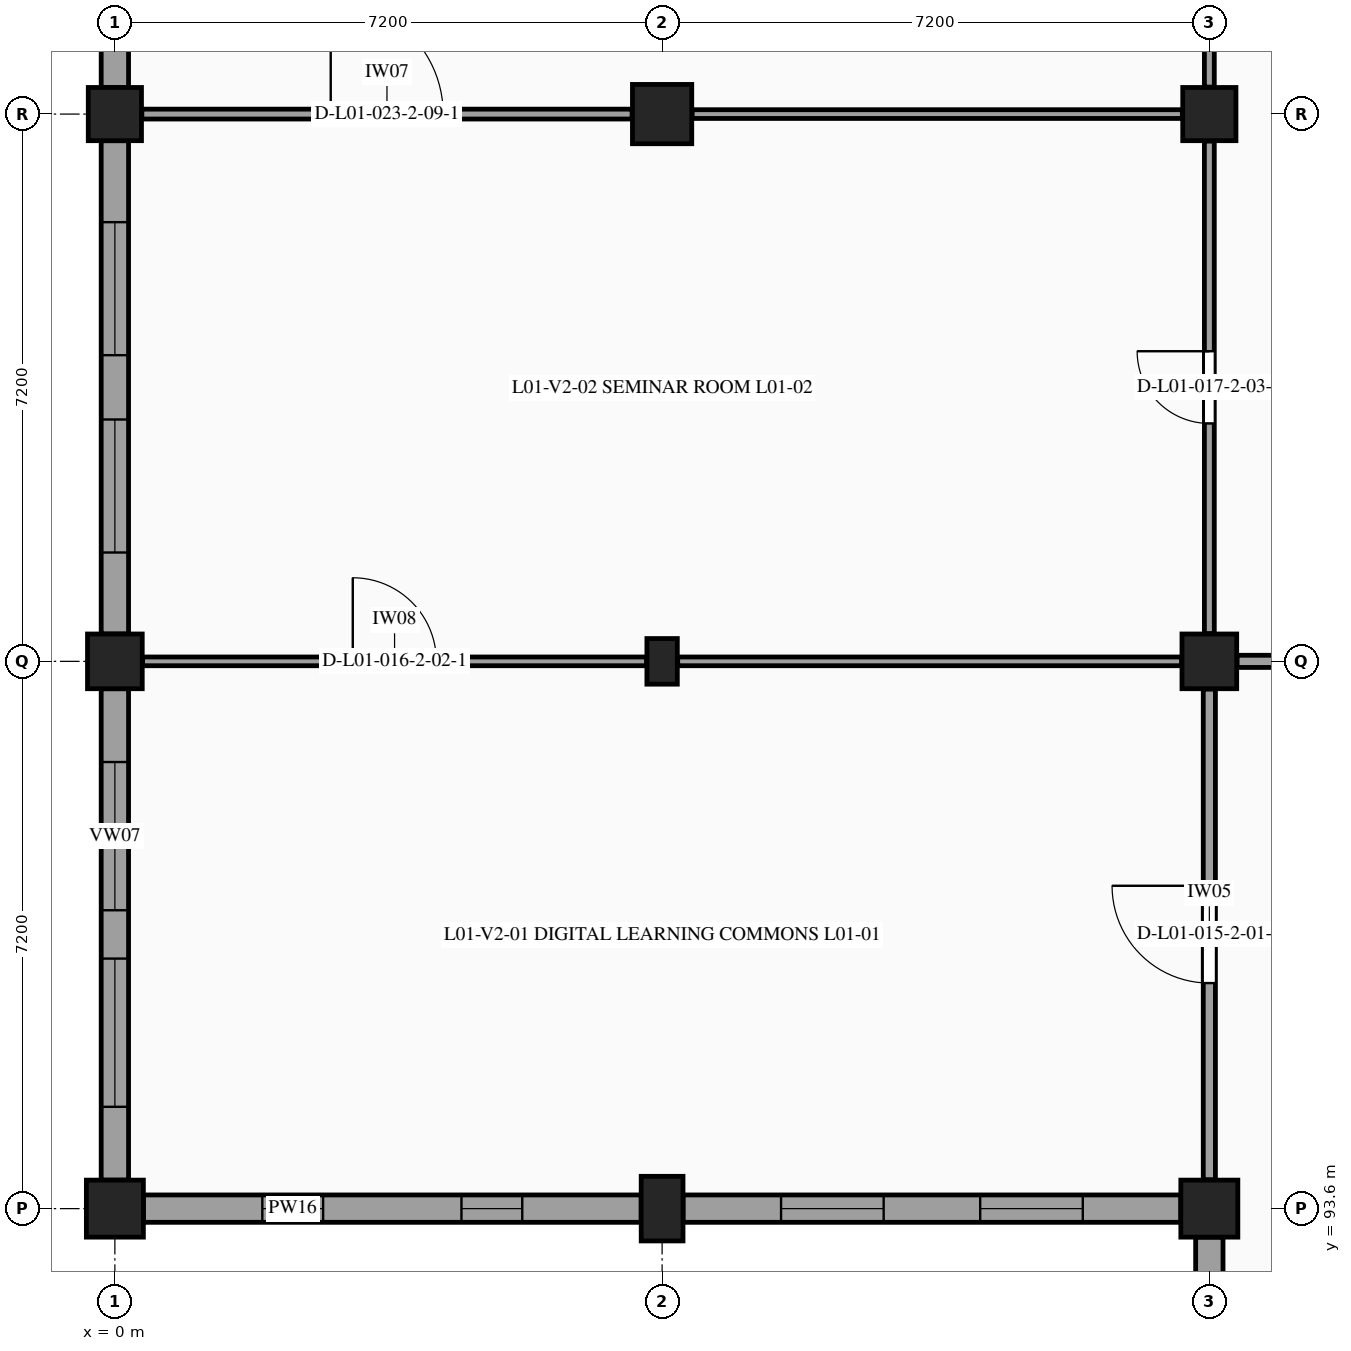
"""IFC4 building model, lengths in metres.
Left out: names, types, materials, properties, quantities, classifications, styles, units other than length and angle.
Written with IfcOpenShell. Run it as: python <this file> out.ifc"""

import sys

from ifc_helpers import new_model, si_unit, direction, frame, frame_2d, origin, origin_2d, place, context, subcontext, project, spatial, rectangle, extrude, element, fill, save


model = new_model("IFC4")
c1 = context("Model", 3, precision=1e-05, world=origin(), true_north=direction((0.0, 1.0)))
c2 = subcontext(c1, "Body", "Model", "MODEL_VIEW")
j1 = project(units=[si_unit("LENGTHUNIT", "METRE"), si_unit("PLANEANGLEUNIT", "RADIAN")], contexts=[c1])
p1 = place(None, origin())
s1 = spatial("IfcSite", under=j1, at=p1, CompositionType="ELEMENT")
p2 = place(p1, origin())
s2 = spatial("IfcBuilding", under=s1, at=p2, CompositionType="ELEMENT")
p3 = place(p2, frame((0.0, 0.0, 5.4)))
s3 = spatial("IfcBuildingStorey", under=s2, at=p3, CompositionType="ELEMENT", Elevation=5.4)
p4 = place(p3, frame((0.0, 93.6, 0.0), z_axis=(0.0, 0.0, 1.0), x_axis=(1.0, 0.0, 0.0)))
e1 = element("IfcColumn", 1, at=p4, inside=s3, PredefinedType="COLUMN", context=c2, shape_type="SweptSolid", body=[
    extrude(rectangle(XDim=0.75, YDim=0.75, at=origin_2d()), origin(), (0.0, 0.0, 1.0), 4.5),
])
p5 = place(p3, frame((0.0, 100.8, 0.0), z_axis=(0.0, 0.0, 1.0), x_axis=(1.0, 0.0, 0.0)))
e2 = element("IfcColumn", 2, at=p5, inside=s3, PredefinedType="COLUMN", context=c2, shape_type="SweptSolid", body=[
    extrude(rectangle(XDim=0.72, YDim=0.72, at=origin_2d()), origin(), (0.0, 0.0, 1.0), 4.5),
])
p6 = place(p3, frame((0.0, 108.0, 0.0), z_axis=(0.0, 0.0, 1.0), x_axis=(1.0, 0.0, 0.0)))
e3 = element("IfcColumn", 3, at=p6, inside=s3, PredefinedType="COLUMN", context=c2, shape_type="SweptSolid", body=[
    extrude(rectangle(XDim=0.7, YDim=0.7, at=origin_2d()), origin(), (0.0, 0.0, 1.0), 4.5),
])
p7 = place(p3, frame((7.2, 93.6, 0.0), z_axis=(0.0, 0.0, 1.0), x_axis=(1.0, 0.0, 0.0)))
e4 = element("IfcColumn", 4, at=p7, inside=s3, PredefinedType="COLUMN", context=c2, shape_type="SweptSolid", body=[
    extrude(rectangle(XDim=0.55, YDim=0.85, at=origin_2d()), origin(), (0.0, 0.0, 1.0), 4.5),
])
p8 = place(p3, frame((7.2, 100.8, 0.0), z_axis=(0.0, 0.0, 1.0), x_axis=(1.0, 0.0, 0.0)))
e5 = element("IfcColumn", 5, at=p8, inside=s3, PredefinedType="PILASTER", context=c2, shape_type="SweptSolid", body=[
    extrude(rectangle(XDim=0.4, YDim=0.6, at=origin_2d()), origin(), (0.0, 0.0, 1.0), 4.5),
])
p9 = place(p3, frame((7.2, 108.0, 0.0), z_axis=(0.0, 0.0, 1.0), x_axis=(1.0, 0.0, 0.0)))
e6 = element("IfcColumn", 6, at=p9, inside=s3, PredefinedType="COLUMN", context=c2, shape_type="SweptSolid", body=[
    extrude(rectangle(XDim=0.78, YDim=0.78, at=origin_2d()), origin(), (0.0, 0.0, 1.0), 4.5),
])
p10 = place(p3, frame((14.4, 93.6, 0.0), z_axis=(0.0, 0.0, 1.0), x_axis=(1.0, 0.0, 0.0)))
e7 = element("IfcColumn", 7, at=p10, inside=s3, PredefinedType="COLUMN", context=c2, shape_type="SweptSolid", body=[
    extrude(rectangle(XDim=0.75, YDim=0.75, at=origin_2d()), origin(), (0.0, 0.0, 1.0), 4.5),
])
p11 = place(p3, frame((14.4, 100.8, 0.0), z_axis=(0.0, 0.0, 1.0), x_axis=(1.0, 0.0, 0.0)))
e8 = element("IfcColumn", 8, at=p11, inside=s3, PredefinedType="COLUMN", context=c2, shape_type="SweptSolid", body=[
    extrude(rectangle(XDim=0.72, YDim=0.72, at=origin_2d()), origin(), (0.0, 0.0, 1.0), 4.5),
])
p12 = place(p3, frame((14.4, 108.0, 0.0), z_axis=(0.0, 0.0, 1.0), x_axis=(1.0, 0.0, 0.0)))
e9 = element("IfcColumn", 9, at=p12, inside=s3, PredefinedType="COLUMN", context=c2, shape_type="SweptSolid", body=[
    extrude(rectangle(XDim=0.7, YDim=0.7, at=origin_2d()), origin(), (0.0, 0.0, 1.0), 4.5),
])
p13 = place(p3, frame((14.4, 86.79, 0.0), z_axis=(0.0, 0.0, 1.0), x_axis=(0.0, 1.0, 0.0)))
e10 = element("IfcWall", 10, at=p13, inside=s3, PredefinedType="STANDARD", context=c2, shape_type="SweptSolid", body=[
    extrude(rectangle(XDim=6.435, YDim=0.36, at=frame_2d((3.218, 0.0))), origin(), (0.0, 0.0, 1.0), 3.455),
])
p14 = place(p13, frame((1.18, 0.0, 1.15)))
e11 = element("IfcOpeningElement", 11, at=p14, cuts=e10, PredefinedType="OPENING", context=c2, shape_type="SweptSolid", body=[
    extrude(rectangle(XDim=1.5, YDim=1.2, at=frame_2d((0.75, 0.6))), frame((0.0, 0.19, 0.0), z_axis=(0.0, -1.0, 0.0), x_axis=(1.0, 0.0, 0.0)), (0.0, 0.0, 1.0), 0.38),
])
p15 = place(p13, frame((3.754, 0.0, 1.15)))
e12 = element("IfcOpeningElement", 12, at=p15, cuts=e10, PredefinedType="OPENING", context=c2, shape_type="SweptSolid", body=[
    extrude(rectangle(XDim=1.5, YDim=1.2, at=frame_2d((0.75, 0.6))), frame((0.0, 0.19, 0.0), z_axis=(0.0, -1.0, 0.0), x_axis=(1.0, 0.0, 0.0)), (0.0, 0.0, 1.0), 0.38),
])
p16 = place(p3, frame((14.025, 93.6, 0.0), z_axis=(0.0, 0.0, 1.0), x_axis=(-1.0, 0.0, 0.0)))
e13 = element("IfcWall", 13, at=p16, inside=s3, PredefinedType="STANDARD", context=c2, shape_type="SweptSolid", body=[
    extrude(rectangle(XDim=6.55, YDim=0.36, at=frame_2d((3.275, 0.0))), origin(), (0.0, 0.0, 1.0), 3.49),
])
p17 = place(p16, frame((1.29, 0.0, 1.15)))
e14 = element("IfcOpeningElement", 14, at=p17, cuts=e13, PredefinedType="OPENING", context=c2, shape_type="SweptSolid", body=[
    extrude(rectangle(XDim=1.35, YDim=1.1, at=frame_2d((0.675, 0.55))), frame((0.0, 0.19, 0.0), z_axis=(0.0, -1.0, 0.0), x_axis=(1.0, 0.0, 0.0)), (0.0, 0.0, 1.0), 0.38),
])
p18 = place(p16, frame((3.91, 0.0, 1.15)))
e15 = element("IfcOpeningElement", 15, at=p18, cuts=e13, PredefinedType="OPENING", context=c2, shape_type="SweptSolid", body=[
    extrude(rectangle(XDim=1.35, YDim=1.1, at=frame_2d((0.675, 0.55))), frame((0.0, 0.19, 0.0), z_axis=(0.0, -1.0, 0.0), x_axis=(1.0, 0.0, 0.0)), (0.0, 0.0, 1.0), 0.38),
])
p19 = place(p3, frame((6.925, 93.6, 0.0), z_axis=(0.0, 0.0, 1.0), x_axis=(-1.0, 0.0, 0.0)))
e16 = element("IfcWall", 16, at=p19, inside=s3, PredefinedType="STANDARD", context=c2, shape_type="SweptSolid", body=[
    extrude(rectangle(XDim=6.55, YDim=0.36, at=frame_2d((3.275, 0.0))), origin(), (0.0, 0.0, 1.0), 3.49),
])
p20 = place(p19, frame((1.565, 0.0, 1.15)))
e17 = element("IfcOpeningElement", 17, at=p20, cuts=e16, PredefinedType="OPENING", context=c2, shape_type="SweptSolid", body=[
    extrude(rectangle(XDim=0.8, YDim=1.5, at=frame_2d((0.4, 0.75))), frame((0.0, 0.19, 0.0), z_axis=(0.0, -1.0, 0.0), x_axis=(1.0, 0.0, 0.0)), (0.0, 0.0, 1.0), 0.38),
])
p21 = place(p19, frame((4.185, 0.0, 1.15)))
e18 = element("IfcOpeningElement", 18, at=p21, cuts=e16, PredefinedType="OPENING", context=c2, shape_type="SweptSolid", body=[
    extrude(rectangle(XDim=0.8, YDim=1.5, at=frame_2d((0.4, 0.75))), frame((0.0, 0.19, 0.0), z_axis=(0.0, -1.0, 0.0), x_axis=(1.0, 0.0, 0.0)), (0.0, 0.0, 1.0), 0.38),
])
p22 = place(p3, frame((0.0, 93.975, 0.0), z_axis=(0.0, 0.0, 1.0), x_axis=(0.0, 1.0, 0.0)))
e19 = element("IfcWall", 19, at=p22, inside=s3, PredefinedType="STANDARD", context=c2, shape_type="SweptSolid", body=[
    extrude(rectangle(XDim=6.465, YDim=0.36, at=frame_2d((3.232, 0.0))), origin(), (0.0, 0.0, 1.0), 3.455),
])
p23 = place(p22, frame((0.965, 0.0, 1.15)))
e20 = element("IfcOpeningElement", 20, at=p23, cuts=e19, PredefinedType="OPENING", context=c2, shape_type="SweptSolid", body=[
    extrude(rectangle(XDim=1.95, YDim=1.4, at=frame_2d((0.975, 0.7))), frame((0.0, 0.19, 0.0), z_axis=(0.0, -1.0, 0.0), x_axis=(1.0, 0.0, 0.0)), (0.0, 0.0, 1.0), 0.38),
])
p24 = place(p22, frame((3.551, 0.0, 1.15)))
e21 = element("IfcOpeningElement", 21, at=p24, cuts=e19, PredefinedType="OPENING", context=c2, shape_type="SweptSolid", body=[
    extrude(rectangle(XDim=1.95, YDim=1.4, at=frame_2d((0.975, 0.7))), frame((0.0, 0.19, 0.0), z_axis=(0.0, -1.0, 0.0), x_axis=(1.0, 0.0, 0.0)), (0.0, 0.0, 1.0), 0.38),
])
p25 = place(p3, frame((0.0, 101.16, 0.0), z_axis=(0.0, 0.0, 1.0), x_axis=(0.0, 1.0, 0.0)))
e22 = element("IfcWall", 22, at=p25, inside=s3, PredefinedType="STANDARD", context=c2, shape_type="SweptSolid", body=[
    extrude(rectangle(XDim=6.49, YDim=0.36, at=frame_2d((3.245, 0.0))), origin(), (0.0, 0.0, 1.0), 3.455),
])
p26 = place(p25, frame((1.072, 0.0, 1.15)))
e23 = element("IfcOpeningElement", 23, at=p26, cuts=e22, PredefinedType="OPENING", context=c2, shape_type="SweptSolid", body=[
    extrude(rectangle(XDim=1.75, YDim=1.4, at=frame_2d((0.875, 0.7))), frame((0.0, 0.19, 0.0), z_axis=(0.0, -1.0, 0.0), x_axis=(1.0, 0.0, 0.0)), (0.0, 0.0, 1.0), 0.38),
])
p27 = place(p25, frame((3.668, 0.0, 1.15)))
e24 = element("IfcOpeningElement", 24, at=p27, cuts=e22, PredefinedType="OPENING", context=c2, shape_type="SweptSolid", body=[
    extrude(rectangle(XDim=1.75, YDim=1.4, at=frame_2d((0.875, 0.7))), frame((0.0, 0.19, 0.0), z_axis=(0.0, -1.0, 0.0), x_axis=(1.0, 0.0, 0.0)), (0.0, 0.0, 1.0), 0.38),
])
p28 = place(p3, frame((0.0, 108.35, 0.0), z_axis=(0.0, 0.0, 1.0), x_axis=(0.0, 1.0, 0.0)))
e25 = element("IfcWall", 25, at=p28, inside=s3, PredefinedType="STANDARD", context=c2, shape_type="SweptSolid", body=[
    extrude(rectangle(XDim=6.425, YDim=0.36, at=frame_2d((3.212, 0.0))), origin(), (0.0, 0.0, 1.0), 3.455),
])
p29 = place(p28, frame((1.153, 0.0, 1.15)))
e26 = element("IfcOpeningElement", 26, at=p29, cuts=e25, PredefinedType="OPENING", context=c2, shape_type="SweptSolid", body=[
    extrude(rectangle(XDim=1.55, YDim=1.35, at=frame_2d((0.775, 0.675))), frame((0.0, 0.19, 0.0), z_axis=(0.0, -1.0, 0.0), x_axis=(1.0, 0.0, 0.0)), (0.0, 0.0, 1.0), 0.38),
])
p30 = place(p28, frame((3.722, 0.0, 1.15)))
e27 = element("IfcOpeningElement", 27, at=p30, cuts=e25, PredefinedType="OPENING", context=c2, shape_type="SweptSolid", body=[
    extrude(rectangle(XDim=1.55, YDim=1.35, at=frame_2d((0.775, 0.675))), frame((0.0, 0.19, 0.0), z_axis=(0.0, -1.0, 0.0), x_axis=(1.0, 0.0, 0.0)), (0.0, 0.0, 1.0), 0.38),
])
p31 = place(p3, frame((0.365, 100.8, 0.0), z_axis=(0.0, 0.0, 1.0), x_axis=(1.0, 0.0, 0.0)))
e28 = element("IfcWall", 28, at=p31, inside=s3, PredefinedType="PARTITIONING", context=c2, shape_type="SweptSolid", body=[
    extrude(rectangle(XDim=6.63, YDim=0.115, at=frame_2d((3.315, 0.0))), origin(), (0.0, 0.0, 1.0), 3.46),
])
p32 = place(p31, frame((2.765, 0.0, 0.0)))
e29 = element("IfcOpeningElement", 29, at=p32, cuts=e28, PredefinedType="OPENING", context=c2, shape_type="SweptSolid", body=[
    extrude(rectangle(XDim=1.1, YDim=2.15, at=frame_2d((0.55, 1.075))), frame((0.0, 0.067, 0.0), z_axis=(0.0, -1.0, 0.0), x_axis=(1.0, 0.0, 0.0)), (0.0, 0.0, 1.0), 0.135),
])
p33 = place(p3, frame((0.355, 108.0, 0.0), z_axis=(0.0, 0.0, 1.0), x_axis=(1.0, 0.0, 0.0)))
e30 = element("IfcWall", 30, at=p33, inside=s3, PredefinedType="PARTITIONING", context=c2, shape_type="SweptSolid", body=[
    extrude(rectangle(XDim=6.45, YDim=0.13, at=frame_2d((3.225, 0.0))), origin(), (0.0, 0.0, 1.0), 3.46),
])
p34 = place(p33, frame((2.485, 0.0, 0.0)))
e31 = element("IfcOpeningElement", 31, at=p34, cuts=e30, PredefinedType="OPENING", context=c2, shape_type="SweptSolid", body=[
    extrude(rectangle(XDim=1.48, YDim=2.28, at=frame_2d((0.74, 1.14))), frame((0.0, 0.075, 0.0), z_axis=(0.0, -1.0, 0.0), x_axis=(1.0, 0.0, 0.0)), (0.0, 0.0, 1.0), 0.15),
])
p35 = place(p3, frame((14.4, 93.98, 0.0), z_axis=(0.0, 0.0, 1.0), x_axis=(0.0, 1.0, 0.0)))
e32 = element("IfcWall", 32, at=p35, inside=s3, PredefinedType="PARTITIONING", context=c2, shape_type="SweptSolid", body=[
    extrude(rectangle(XDim=6.455, YDim=0.16, at=frame_2d((3.228, 0.0))), origin(), (0.0, 0.0, 1.0), 3.575),
])
p36 = place(p35, frame((2.587, 0.0, 0.0)))
e33 = element("IfcOpeningElement", 33, at=p36, cuts=e32, PredefinedType="OPENING", context=c2, shape_type="SweptSolid", body=[
    extrude(rectangle(XDim=1.28, YDim=2.24, at=frame_2d((0.64, 1.12))), frame((0.0, 0.09, 0.0), z_axis=(0.0, -1.0, 0.0), x_axis=(1.0, 0.0, 0.0)), (0.0, 0.0, 1.0), 0.18),
])
p37 = place(p3, frame((7.405, 100.8, 0.0), z_axis=(0.0, 0.0, 1.0), x_axis=(1.0, 0.0, 0.0)))
e34 = element("IfcWall", 34, at=p37, inside=s3, PredefinedType="PARTITIONING", context=c2, shape_type="SweptSolid", body=[
    extrude(rectangle(XDim=6.63, YDim=0.115, at=frame_2d((3.315, 0.0))), origin(), (0.0, 0.0, 1.0), 3.47),
])
p38 = place(p3, frame((14.4, 101.165, 0.0), z_axis=(0.0, 0.0, 1.0), x_axis=(0.0, 1.0, 0.0)))
e35 = element("IfcWall", 35, at=p38, inside=s3, PredefinedType="PARTITIONING", context=c2, shape_type="SweptSolid", body=[
    extrude(rectangle(XDim=6.48, YDim=0.13, at=frame_2d((3.24, 0.0))), origin(), (0.0, 0.0, 1.0), 3.525),
])
p39 = place(p38, frame((2.765, 0.0, 0.0)))
e36 = element("IfcOpeningElement", 36, at=p39, cuts=e35, PredefinedType="OPENING", context=c2, shape_type="SweptSolid", body=[
    extrude(rectangle(XDim=0.95, YDim=2.15, at=frame_2d((0.475, 1.075))), frame((0.0, 0.075, 0.0), z_axis=(0.0, -1.0, 0.0), x_axis=(1.0, 0.0, 0.0)), (0.0, 0.0, 1.0), 0.15),
])
p40 = place(p3, frame((7.595, 108.0, 0.0), z_axis=(0.0, 0.0, 1.0), x_axis=(1.0, 0.0, 0.0)))
e37 = element("IfcWall", 37, at=p40, inside=s3, PredefinedType="PARTITIONING", context=c2, shape_type="SweptSolid", body=[
    extrude(rectangle(XDim=6.45, YDim=0.115, at=frame_2d((3.225, 0.0))), origin(), (0.0, 0.0, 1.0), 3.47),
])
p41 = place(p3, frame((14.4, 108.355, 0.0), z_axis=(0.0, 0.0, 1.0), x_axis=(0.0, 1.0, 0.0)))
e38 = element("IfcWall", 38, at=p41, inside=s3, PredefinedType="PARTITIONING", context=c2, shape_type="SweptSolid", body=[
    extrude(rectangle(XDim=6.415, YDim=0.13, at=frame_2d((3.208, 0.0))), origin(), (0.0, 0.0, 1.0), 3.525),
])
p42 = place(p3, frame((14.765, 100.8, 0.0), z_axis=(0.0, 0.0, 1.0), x_axis=(1.0, 0.0, 0.0)))
e39 = element("IfcWall", 39, at=p42, inside=s3, PredefinedType="PARTITIONING", context=c2, shape_type="SweptSolid", body=[
    extrude(rectangle(XDim=6.63, YDim=0.16, at=frame_2d((3.315, 0.0))), origin(), (0.0, 0.0, 1.0), 3.485),
])
p43 = place(p17, origin())
e40 = element("IfcWindow", 40, at=p43, inside=s3, PartitioningType="SINGLE_PANEL", PredefinedType="WINDOW", context=c2, shape_type="SweptSolid", body=[
    extrude(rectangle(XDim=1.35, YDim=1.1, at=frame_2d((0.675, 0.55))), frame((0.0, -0.08, 0.0), z_axis=(0.0, -1.0, 0.0), x_axis=(1.0, 0.0, 0.0)), (0.0, 0.0, 1.0), 0.06),
])
fill(e14, e40)
p44 = place(p18, origin())
e41 = element("IfcWindow", 41, at=p44, inside=s3, PartitioningType="SINGLE_PANEL", PredefinedType="WINDOW", context=c2, shape_type="SweptSolid", body=[
    extrude(rectangle(XDim=1.35, YDim=1.1, at=frame_2d((0.675, 0.55))), frame((0.0, -0.08, 0.0), z_axis=(0.0, -1.0, 0.0), x_axis=(1.0, 0.0, 0.0)), (0.0, 0.0, 1.0), 0.06),
])
fill(e15, e41)
p45 = place(p20, origin())
e42 = element("IfcWindow", 42, at=p45, inside=s3, PartitioningType="SINGLE_PANEL", PredefinedType="WINDOW", context=c2, shape_type="SweptSolid", body=[
    extrude(rectangle(XDim=0.8, YDim=1.5, at=frame_2d((0.4, 0.75))), frame((0.0, -0.08, 0.0), z_axis=(0.0, -1.0, 0.0), x_axis=(1.0, 0.0, 0.0)), (0.0, 0.0, 1.0), 0.06),
])
fill(e17, e42)
p46 = place(p21, origin())
e43 = element("IfcWindow", 43, at=p46, inside=s3, PartitioningType="SINGLE_PANEL", PredefinedType="WINDOW", context=c2, shape_type="SweptSolid", body=[
    extrude(rectangle(XDim=0.8, YDim=1.5, at=frame_2d((0.4, 0.75))), frame((0.0, -0.08, 0.0), z_axis=(0.0, -1.0, 0.0), x_axis=(1.0, 0.0, 0.0)), (0.0, 0.0, 1.0), 0.06),
])
fill(e18, e43)
p47 = place(p23, origin())
e44 = element("IfcWindow", 44, at=p47, inside=s3, PartitioningType="SINGLE_PANEL", PredefinedType="WINDOW", context=c2, shape_type="SweptSolid", body=[
    extrude(rectangle(XDim=1.95, YDim=1.4, at=frame_2d((0.975, 0.7))), frame((0.0, -0.08, 0.0), z_axis=(0.0, -1.0, 0.0), x_axis=(1.0, 0.0, 0.0)), (0.0, 0.0, 1.0), 0.06),
])
fill(e20, e44)
p48 = place(p24, origin())
e45 = element("IfcWindow", 45, at=p48, inside=s3, PartitioningType="SINGLE_PANEL", PredefinedType="WINDOW", context=c2, shape_type="SweptSolid", body=[
    extrude(rectangle(XDim=1.95, YDim=1.4, at=frame_2d((0.975, 0.7))), frame((0.0, -0.08, 0.0), z_axis=(0.0, -1.0, 0.0), x_axis=(1.0, 0.0, 0.0)), (0.0, 0.0, 1.0), 0.06),
])
fill(e21, e45)
p49 = place(p26, origin())
e46 = element("IfcWindow", 46, at=p49, inside=s3, PartitioningType="SINGLE_PANEL", PredefinedType="WINDOW", context=c2, shape_type="SweptSolid", body=[
    extrude(rectangle(XDim=1.75, YDim=1.4, at=frame_2d((0.875, 0.7))), frame((0.0, -0.08, 0.0), z_axis=(0.0, -1.0, 0.0), x_axis=(1.0, 0.0, 0.0)), (0.0, 0.0, 1.0), 0.06),
])
fill(e23, e46)
p50 = place(p27, origin())
e47 = element("IfcWindow", 47, at=p50, inside=s3, PartitioningType="SINGLE_PANEL", PredefinedType="WINDOW", context=c2, shape_type="SweptSolid", body=[
    extrude(rectangle(XDim=1.75, YDim=1.4, at=frame_2d((0.875, 0.7))), frame((0.0, -0.08, 0.0), z_axis=(0.0, -1.0, 0.0), x_axis=(1.0, 0.0, 0.0)), (0.0, 0.0, 1.0), 0.06),
])
fill(e24, e47)
p51 = place(p36, origin())
e48 = element("IfcDoor", 48, at=p51, inside=s3, OperationType="SINGLE_SWING_RIGHT", PredefinedType="DOOR", context=c2, shape_type="SweptSolid", body=[
    extrude(rectangle(XDim=1.28, YDim=2.24, at=frame_2d((0.64, 1.12))), frame((0.0, 0.025, 0.0), z_axis=(0.0, -1.0, 0.0), x_axis=(1.0, 0.0, 0.0)), (0.0, 0.0, 1.0), 0.05),
])
fill(e33, e48)
p52 = place(p32, origin())
e49 = element("IfcDoor", 49, at=p52, inside=s3, OperationType="SINGLE_SWING_LEFT", PredefinedType="DOOR", context=c2, shape_type="SweptSolid", body=[
    extrude(rectangle(XDim=1.1, YDim=2.15, at=frame_2d((0.55, 1.075))), frame((0.0, 0.025, 0.0), z_axis=(0.0, -1.0, 0.0), x_axis=(1.0, 0.0, 0.0)), (0.0, 0.0, 1.0), 0.05),
])
fill(e29, e49)
p53 = place(p39, origin())
e50 = element("IfcDoor", 50, at=p53, inside=s3, OperationType="SINGLE_SWING_RIGHT", PredefinedType="DOOR", context=c2, shape_type="SweptSolid", body=[
    extrude(rectangle(XDim=0.95, YDim=2.15, at=frame_2d((0.475, 1.075))), frame((0.0, 0.025, 0.0), z_axis=(0.0, -1.0, 0.0), x_axis=(1.0, 0.0, 0.0)), (0.0, 0.0, 1.0), 0.05),
])
fill(e36, e50)
p54 = place(p34, origin())
e51 = element("IfcDoor", 51, at=p54, inside=s3, OperationType="SINGLE_SWING_LEFT", PredefinedType="DOOR", context=c2, shape_type="SweptSolid", body=[
    extrude(rectangle(XDim=1.48, YDim=2.28, at=frame_2d((0.74, 1.14))), frame((0.0, 0.025, 0.0), z_axis=(0.0, -1.0, 0.0), x_axis=(1.0, 0.0, 0.0)), (0.0, 0.0, 1.0), 0.05),
])
fill(e31, e51)
save(model, sys.argv[1])
